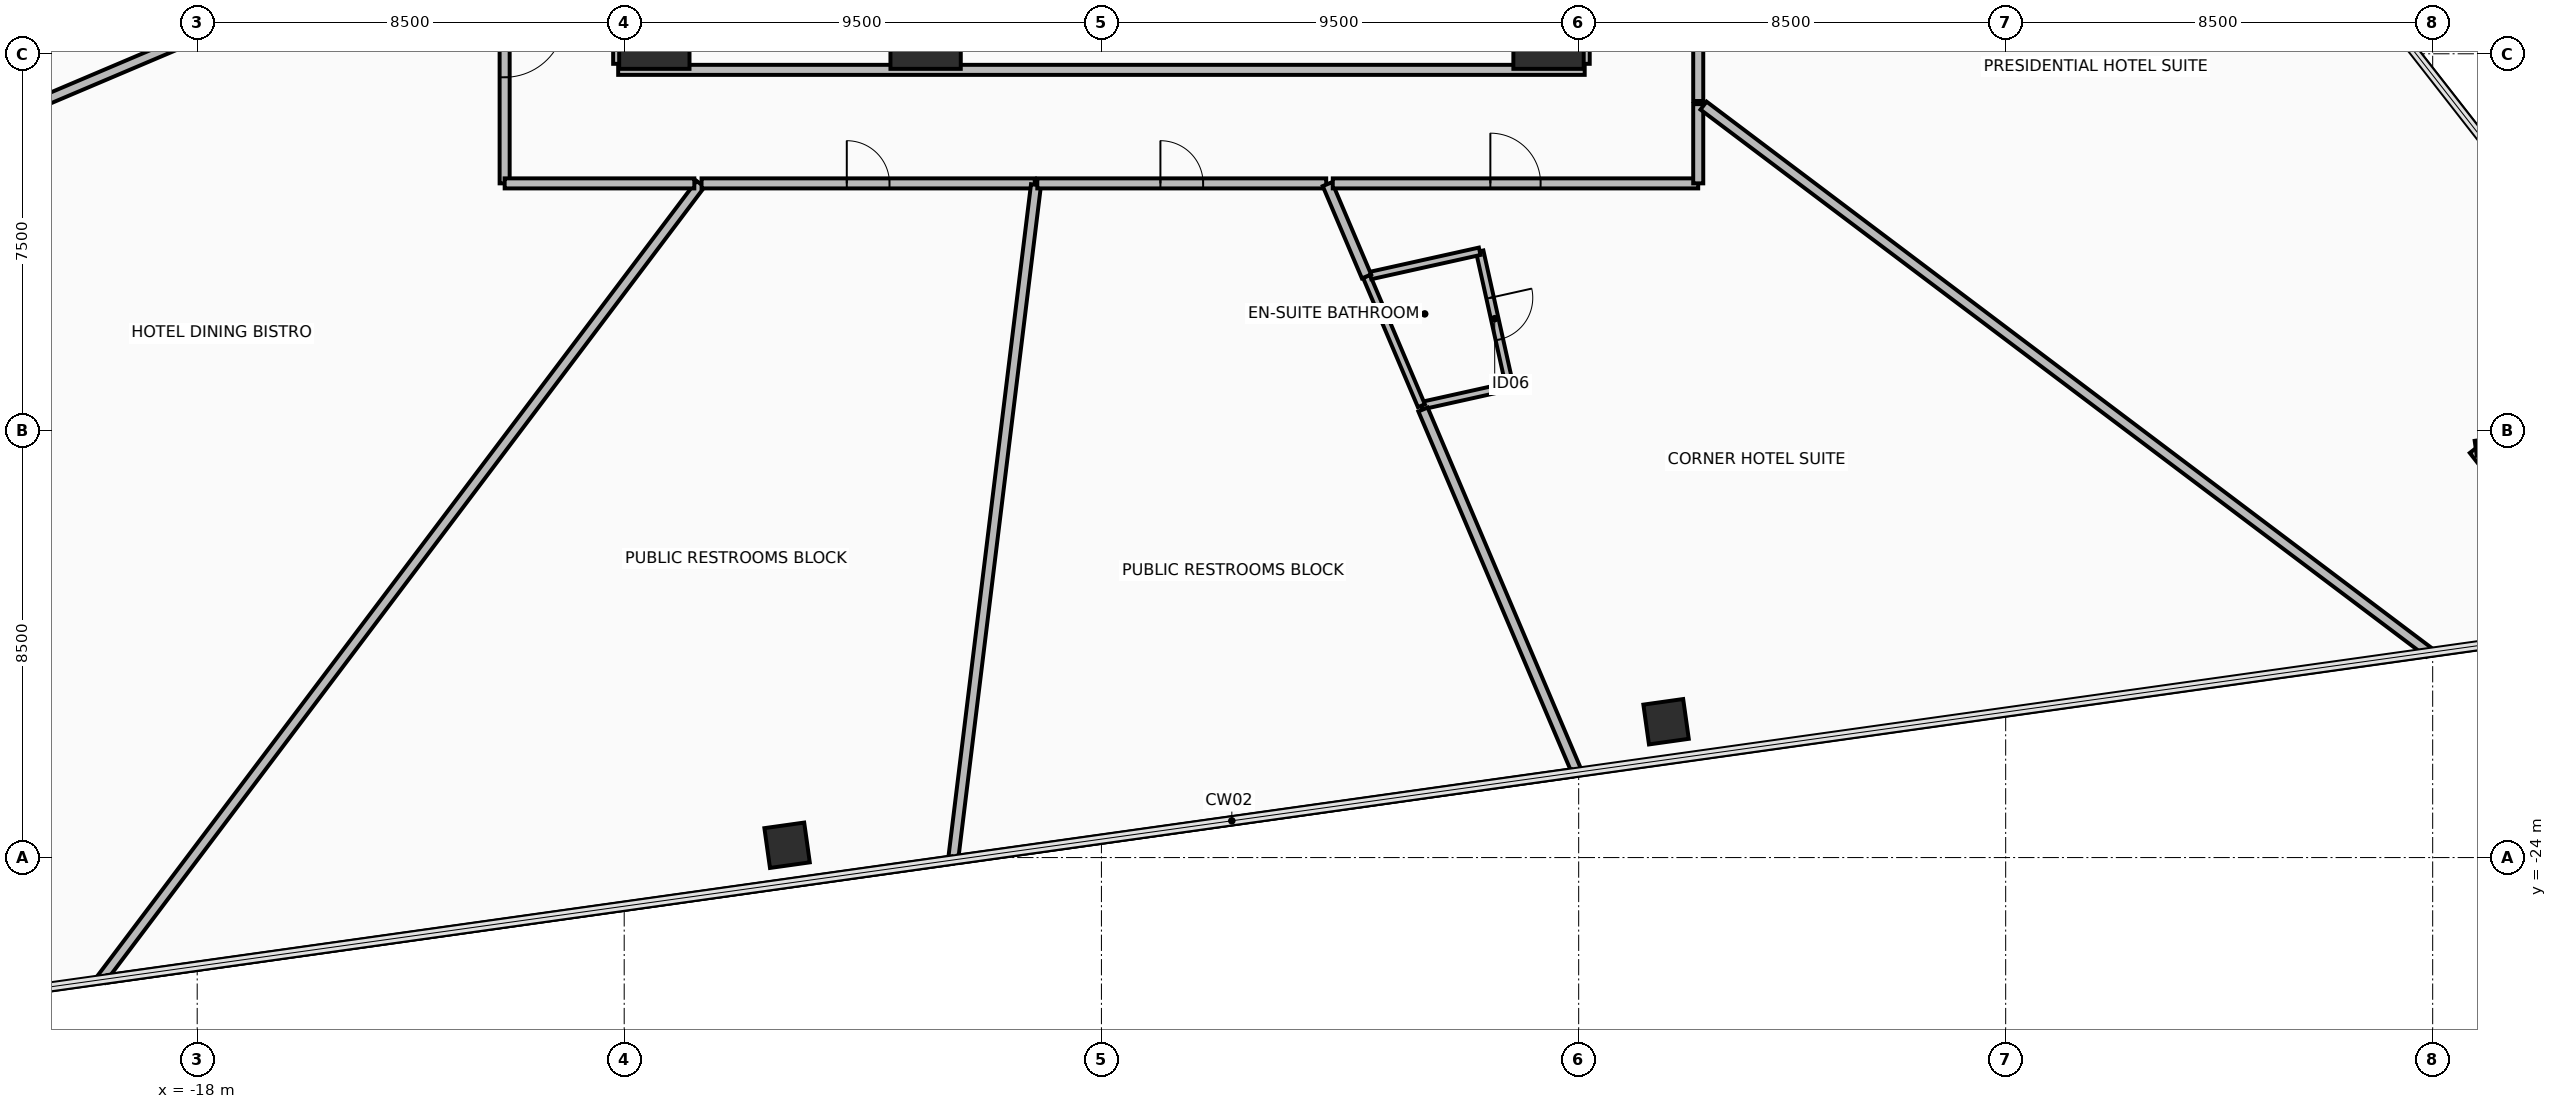
"""IFC4 building model, lengths in metres.
Left out: names, types, materials, properties, quantities, classifications, styles, units other than length and angle.
Written with IfcOpenShell. Run it as: python <this file> out.ifc"""

import sys

from ifc_helpers import new_model, si_unit, direction, frame, frame_2d, origin, origin_2d, place, context, subcontext, project, spatial, rectangle, hollow_rectangle, extrude, element, fill, save


model = new_model("IFC4")
c1 = context("Model", 3, precision=1e-05, world=origin(), true_north=direction((0.0, 1.0)))
c2 = subcontext(c1, "Body", "Model", "MODEL_VIEW")
j1 = project(units=[si_unit("LENGTHUNIT", "METRE"), si_unit("PLANEANGLEUNIT", "RADIAN")], contexts=[c1])
p1 = place(None, origin())
s1 = spatial("IfcSite", under=j1, at=p1, CompositionType="ELEMENT")
p2 = place(p1, origin())
s2 = spatial("IfcBuilding", under=s1, at=p2, CompositionType="ELEMENT")
p3 = place(p2, frame((0.0, 0.0, 74.2)))
s3 = spatial("IfcBuildingStorey", under=s2, at=p3, CompositionType="ELEMENT", Elevation=74.2)
for number, where, z_axis, x_axis in (
    (1, (-8.9, -7.6, 0.0), (0.0, 0.0, 1.0), (1.0, 0.0, 0.0)),
    (2, (-3.5, -7.6, 0.0), (0.0, 0.0, 1.0), (1.0, 0.0, 0.0)),
    (3, (8.9, -7.6, 0.0), (0.0, 0.0, 1.0), (1.0, 0.0, 0.0)),
):
    element("IfcColumn", number, at=place(p3, frame(where, z_axis=z_axis, x_axis=x_axis)), inside=s3, PredefinedType="COLUMN", context=c2, shape_type="SweptSolid", body=[
        extrude(rectangle(XDim=1.4, YDim=1.4, at=origin_2d()), origin(), (0.0, 0.0, 1.0), 3.45),
    ])
for number, where, z_axis, x_axis in (
    (4, (-6.257, -23.755, 0.0), (0.0, 0.0, 1.0), (0.99, 0.139, 0.0)),
    (5, (11.24, -21.296, 0.0), (0.0, 0.0, 1.0), (0.99, 0.139, 0.0)),
):
    element("IfcColumn", number, at=place(p3, frame(where, z_axis=z_axis, x_axis=x_axis)), inside=s3, PredefinedType="COLUMN", context=c2, shape_type="SweptSolid", body=[
        extrude(hollow_rectangle(XDim=0.8, YDim=0.8, WallThickness=0.045, at=origin_2d()), origin(), (0.0, 0.0, 1.0), 3.45),
    ])
p4 = place(p3, frame((30.128, -19.399, 0.0), z_axis=(0.0, 0.0, 1.0), x_axis=(-0.615621932091, 0.78804164657, 0.0)))
e6 = element("IfcWall", 6, at=p4, inside=s3, PredefinedType="STANDARD", context=c2, shape_type="SweptSolid", body=[
    extrude(rectangle(XDim=4.5, YDim=0.3, at=frame_2d((2.25, 0.0))), origin(), (0.0, 0.0, 1.0), 2.47),
])
p5 = place(p3, frame((27.357, -15.853, 0.0), z_axis=(0.0, 0.0, 1.0), x_axis=(0.990269200152, 0.139165050317, 0.0)))
e7 = element("IfcWall", 7, at=p5, inside=s3, PredefinedType="STANDARD", context=c2, shape_type="SweptSolid", body=[
    extrude(rectangle(XDim=4.5, YDim=0.3, at=frame_2d((2.25, 0.0))), origin(), (0.0, 0.0, 1.0), 2.47),
])
p6 = place(p3, frame((-9.62, -8.32, 0.0), z_axis=(0.0, 0.0, 1.0), x_axis=(1.0, 0.0, 0.0)))
e8 = element("IfcWall", 8, at=p6, inside=s3, PredefinedType="PARTITIONING", context=c2, shape_type="SweptSolid", body=[
    extrude(rectangle(XDim=19.24, YDim=0.2, at=frame_2d((9.62, 0.0))), origin(), (0.0, 0.0, 1.0), 2.67),
])
p7 = place(p3, frame((-9.62, 8.2, 0.0), z_axis=(0.0, 0.0, 1.0), x_axis=(0.0, -1.0, 0.0)))
e9 = element("IfcWall", 9, at=p7, inside=s3, PredefinedType="PARTITIONING", context=c2, shape_type="SweptSolid", body=[
    extrude(rectangle(XDim=16.4, YDim=0.2, at=frame_2d((8.2, 0.0))), origin(), (0.0, 0.0, 1.0), 2.67),
])
p8 = place(p7, frame((12.65, 0.0, 0.0)))
e10 = element("IfcOpeningElement", 10, at=p8, cuts=e9, PredefinedType="OPENING", context=c2, shape_type="SweptSolid", body=[
    extrude(rectangle(XDim=1.1, YDim=2.15, at=frame_2d((0.55, 1.075))), frame((0.0, 0.11, 0.0), z_axis=(0.0, -1.0, 0.0), x_axis=(1.0, 0.0, 0.0)), (0.0, 0.0, 1.0), 0.22),
])
p9 = place(p3, frame((9.62, -8.2, 0.0), z_axis=(0.0, 0.0, 1.0), x_axis=(0.0, 1.0, 0.0)))
e11 = element("IfcWall", 11, at=p9, inside=s3, PredefinedType="PARTITIONING", context=c2, shape_type="SweptSolid", body=[
    extrude(rectangle(XDim=16.4, YDim=0.2, at=frame_2d((8.2, 0.0))), origin(), (0.0, 0.0, 1.0), 2.67),
])
p10 = place(p9, frame((12.65, 0.0, 0.0)))
e12 = element("IfcOpeningElement", 12, at=p10, cuts=e11, PredefinedType="OPENING", context=c2, shape_type="SweptSolid", body=[
    extrude(rectangle(XDim=1.1, YDim=2.15, at=frame_2d((0.55, 1.075))), frame((0.0, 0.11, 0.0), z_axis=(0.0, -1.0, 0.0), x_axis=(1.0, 0.0, 0.0)), (0.0, 0.0, 1.0), 0.22),
])
p11 = place(p3, frame((7.53, -11.931, 0.0), z_axis=(0.0, 0.0, 1.0), x_axis=(0.216986861088, -0.976174524414, 0.0)))
e13 = element("IfcWall", 13, at=p11, inside=s3, PredefinedType="PARTITIONING", context=c2, shape_type="SweptSolid", body=[
    extrude(rectangle(XDim=2.75, YDim=0.15, at=frame_2d((1.375, 0.0))), origin(), (0.0, 0.0, 1.0), 3.275),
])
p12 = place(p11, frame((0.95, 0.0, 0.0)))
e14 = element("IfcOpeningElement", 14, at=p12, cuts=e13, PredefinedType="OPENING", context=c2, shape_type="SweptSolid", body=[
    extrude(rectangle(XDim=0.85, YDim=2.1, at=frame_2d((0.425, 1.05))), frame((0.0, 0.085, 0.0), z_axis=(0.0, -1.0, 0.0), x_axis=(1.0, 0.0, 0.0)), (0.0, 0.0, 1.0), 0.17),
])
p13 = place(p3, frame((8.049, -14.633, 0.0), z_axis=(0.0, 0.0, 1.0), x_axis=(-0.976193739746, -0.216900397605, 0.0)))
e15 = element("IfcWall", 15, at=p13, inside=s3, PredefinedType="PARTITIONING", context=c2, shape_type="SweptSolid", body=[
    extrude(rectangle(XDim=1.72, YDim=0.15, at=frame_2d((0.86, 0.0))), origin(), (0.0, 0.0, 1.0), 3.275),
])
p14 = place(p3, frame((6.37, -15.006, 0.0), z_axis=(0.0, 0.0, 1.0), x_axis=(-0.390682122561, 0.920525653695, 0.0)))
e16 = element("IfcWall", 16, at=p14, inside=s3, PredefinedType="PARTITIONING", context=c2, shape_type="SweptSolid", body=[
    extrude(rectangle(XDim=2.796, YDim=0.15, at=frame_2d((1.398, 0.0))), origin(), (0.0, 0.0, 1.0), 3.275),
])
p15 = place(p3, frame((5.356, -12.414, 0.0), z_axis=(0.0, 0.0, 1.0), x_axis=(0.976174158984, 0.216988505069, 0.0)))
e17 = element("IfcWall", 17, at=p15, inside=s3, PredefinedType="PARTITIONING", context=c2, shape_type="SweptSolid", body=[
    extrude(rectangle(XDim=2.227, YDim=0.15, at=frame_2d((1.113, 0.0))), origin(), (0.0, 0.0, 1.0), 3.275),
])
p16 = place(p3, frame((-19.918, -26.433, 0.0), z_axis=(0.0, 0.0, 1.0), x_axis=(0.601823847332, 0.798628860475, 0.0)))
e18 = element("IfcWall", 18, at=p16, inside=s3, PredefinedType="PARTITIONING", context=c2, shape_type="SweptSolid", body=[
    extrude(rectangle(XDim=19.837, YDim=0.2, at=frame_2d((9.918, 0.0))), origin(), (0.0, 0.0, 1.0), 2.47),
])
p17 = place(p3, frame((-7.96, -10.58, 0.0), z_axis=(0.0, 0.0, 1.0), x_axis=(1.0, 0.0, 0.0)))
e19 = element("IfcWall", 19, at=p17, inside=s3, PredefinedType="PARTITIONING", context=c2, shape_type="SweptSolid", body=[
    extrude(rectangle(XDim=6.633, YDim=0.2, at=frame_2d((3.316, 0.0))), origin(), (0.0, 0.0, 1.0), 3.275),
])
p18 = place(p17, frame((2.891, 0.0, 0.0)))
e20 = element("IfcOpeningElement", 20, at=p18, cuts=e19, PredefinedType="OPENING", context=c2, shape_type="SweptSolid", body=[
    extrude(rectangle(XDim=0.85, YDim=2.1, at=frame_2d((0.425, 1.05))), frame((0.0, 0.11, 0.0), z_axis=(0.0, -1.0, 0.0), x_axis=(1.0, 0.0, 0.0)), (0.0, 0.0, 1.0), 0.22),
])
p19 = place(p3, frame((-1.302, -10.608, 0.0), z_axis=(0.0, 0.0, 1.0), x_axis=(-0.121870082422, -0.992546060901, 0.0)))
e21 = element("IfcWall", 21, at=p19, inside=s3, PredefinedType="PARTITIONING", context=c2, shape_type="SweptSolid", body=[
    extrude(rectangle(XDim=13.522, YDim=0.2, at=frame_2d((6.761, 0.0))), origin(), (0.0, 0.0, 1.0), 2.47),
])
p20 = place(p3, frame((-2.972, -24.051, 0.0), z_axis=(0.0, 0.0, 1.0), x_axis=(-0.99026786231, -0.13917456979, 0.0)))
e22 = element("IfcWall", 22, at=p20, inside=s3, PredefinedType="PARTITIONING", context=c2, shape_type="SweptSolid", body=[
    extrude(rectangle(XDim=16.965, YDim=0.15, at=frame_2d((8.482, 0.0))), origin(), (0.0, 0.0, 1.0), 3.275),
])
p21 = place(p3, frame((-1.277, -10.58, 0.0), z_axis=(0.0, 0.0, 1.0), x_axis=(1.0, 0.0, 0.0)))
e23 = element("IfcWall", 23, at=p21, inside=s3, PredefinedType="PARTITIONING", context=c2, shape_type="SweptSolid", body=[
    extrude(rectangle(XDim=5.751, YDim=0.2, at=frame_2d((2.875, 0.0))), origin(), (0.0, 0.0, 1.0), 3.275),
])
p22 = place(p21, frame((2.451, 0.0, 0.0)))
e24 = element("IfcOpeningElement", 24, at=p22, cuts=e23, PredefinedType="OPENING", context=c2, shape_type="SweptSolid", body=[
    extrude(rectangle(XDim=0.85, YDim=2.1, at=frame_2d((0.425, 1.05))), frame((0.0, 0.11, 0.0), z_axis=(0.0, -1.0, 0.0), x_axis=(1.0, 0.0, 0.0)), (0.0, 0.0, 1.0), 0.22),
])
p23 = place(p3, frame((4.497, -10.595, 0.0), z_axis=(0.0, 0.0, 1.0), x_axis=(0.390801207123, -0.920475103689, 0.0)))
e25 = element("IfcWall", 25, at=p23, inside=s3, PredefinedType="PARTITIONING", context=c2, shape_type="SweptSolid", body=[
    extrude(rectangle(XDim=1.995, YDim=0.2, at=frame_2d((0.998, 0.0))), origin(), (0.0, 0.0, 1.0), 3.275),
])
p24 = place(p3, frame((6.401, -15.081, 0.0), z_axis=(0.0, 0.0, 1.0), x_axis=(0.390720857349, -0.920509213225, 0.0)))
e26 = element("IfcWall", 26, at=p24, inside=s3, PredefinedType="PARTITIONING", context=c2, shape_type="SweptSolid", body=[
    extrude(rectangle(XDim=7.845, YDim=0.2, at=frame_2d((3.923, 0.0))), origin(), (0.0, 0.0, 1.0), 2.47),
])
p25 = place(p3, frame((9.359, -22.318, 0.0), z_axis=(0.0, 0.0, 1.0), x_axis=(-0.990266692115, -0.139182895813, 0.0)))
e27 = element("IfcWall", 27, at=p25, inside=s3, PredefinedType="PARTITIONING", context=c2, shape_type="SweptSolid", body=[
    extrude(rectangle(XDim=12.324, YDim=0.15, at=frame_2d((6.162, 0.0))), origin(), (0.0, 0.0, 1.0), 3.275),
])
p26 = place(p3, frame((-11.895, -5.049, 0.0), z_axis=(0.0, 0.0, 1.0), x_axis=(-0.920504230584, -0.390732595872, 0.0)))
e28 = element("IfcWall", 28, at=p26, inside=s3, PredefinedType="PARTITIONING", context=c2, shape_type="SweptSolid", body=[
    extrude(rectangle(XDim=10.909, YDim=0.2, at=frame_2d((5.455, 0.0))), origin(), (0.0, 0.0, 1.0), 2.47),
])
p27 = place(p3, frame((-11.88, -5.157, 0.0), z_axis=(0.0, 0.0, 1.0), x_axis=(0.0, -1.0, 0.0)))
e29 = element("IfcWall", 29, at=p27, inside=s3, PredefinedType="PARTITIONING", context=c2, shape_type="SweptSolid", body=[
    extrude(rectangle(XDim=5.423, YDim=0.2, at=frame_2d((2.711, 0.0))), origin(), (0.0, 0.0, 1.0), 2.67),
])
p28 = place(p27, frame((2.111, 0.0, 0.0)))
e30 = element("IfcOpeningElement", 30, at=p28, cuts=e29, PredefinedType="OPENING", context=c2, shape_type="SweptSolid", body=[
    extrude(rectangle(XDim=1.2, YDim=2.15, at=frame_2d((0.6, 1.075))), frame((0.0, 0.11, 0.0), z_axis=(0.0, -1.0, 0.0), x_axis=(1.0, 0.0, 0.0)), (0.0, 0.0, 1.0), 0.22),
])
p29 = place(p3, frame((-11.879, -10.58, 0.0), z_axis=(0.0, 0.0, 1.0), x_axis=(1.0, 0.0, 0.0)))
e31 = element("IfcWall", 31, at=p29, inside=s3, PredefinedType="PARTITIONING", context=c2, shape_type="SweptSolid", body=[
    extrude(rectangle(XDim=3.775, YDim=0.2, at=frame_2d((1.888, 0.0))), origin(), (0.0, 0.0, 1.0), 2.67),
])
p30 = place(p3, frame((4.605, -10.58, 0.0), z_axis=(0.0, 0.0, 1.0), x_axis=(1.0, 0.0, 0.0)))
e32 = element("IfcWall", 32, at=p30, inside=s3, PredefinedType="PARTITIONING", context=c2, shape_type="SweptSolid", body=[
    extrude(rectangle(XDim=7.274, YDim=0.2, at=frame_2d((3.637, 0.0))), origin(), (0.0, 0.0, 1.0), 2.67),
])
p31 = place(p30, frame((3.137, 0.0, 0.0)))
e33 = element("IfcOpeningElement", 33, at=p31, cuts=e32, PredefinedType="OPENING", context=c2, shape_type="SweptSolid", body=[
    extrude(rectangle(XDim=1.0, YDim=2.15, at=frame_2d((0.5, 1.075))), frame((0.0, 0.11, 0.0), z_axis=(0.0, -1.0, 0.0), x_axis=(1.0, 0.0, 0.0)), (0.0, 0.0, 1.0), 0.22),
])
p32 = place(p3, frame((11.88, -10.579, 0.0), z_axis=(0.0, 0.0, 1.0), x_axis=(0.0, 1.0, 0.0)))
e34 = element("IfcWall", 34, at=p32, inside=s3, PredefinedType="PARTITIONING", context=c2, shape_type="SweptSolid", body=[
    extrude(rectangle(XDim=1.577, YDim=0.2, at=frame_2d((0.789, 0.0))), origin(), (0.0, 0.0, 1.0), 2.67),
])
p33 = place(p3, frame((11.985, -9.031, 0.0), z_axis=(0.0, 0.0, 1.0), x_axis=(0.798635951275, -0.601814437623, 0.0)))
e35 = element("IfcWall", 35, at=p33, inside=s3, PredefinedType="PARTITIONING", context=c2, shape_type="SweptSolid", body=[
    extrude(rectangle(XDim=18.09, YDim=0.2, at=frame_2d((9.045, 0.0))), origin(), (0.0, 0.0, 1.0), 2.47),
])
p34 = place(p3, frame((11.88, -8.94, 0.0), z_axis=(0.0, 0.0, 1.0), x_axis=(0.0, 1.0, 0.0)))
e36 = element("IfcWall", 36, at=p34, inside=s3, PredefinedType="PARTITIONING", context=c2, shape_type="SweptSolid", body=[
    extrude(rectangle(XDim=7.453, YDim=0.2, at=frame_2d((3.727, 0.0))), origin(), (0.0, 0.0, 1.0), 2.67),
])
p35 = place(p34, frame((3.226, 0.0, 0.0)))
e37 = element("IfcOpeningElement", 37, at=p35, cuts=e36, PredefinedType="OPENING", context=c2, shape_type="SweptSolid", body=[
    extrude(rectangle(XDim=1.0, YDim=2.15, at=frame_2d((0.5, 1.075))), frame((0.0, 0.11, 0.0), z_axis=(0.0, -1.0, 0.0), x_axis=(1.0, 0.0, 0.0)), (0.0, 0.0, 1.0), 0.22),
])
p36 = place(p12, origin())
e38 = element("IfcDoor", 38, at=p36, inside=s3, OperationType="SINGLE_SWING_RIGHT", PredefinedType="DOOR", context=c2, shape_type="SweptSolid", body=[
    extrude(rectangle(XDim=0.85, YDim=2.1, at=frame_2d((0.425, 1.05))), frame((0.0, 0.025, 0.0), z_axis=(0.0, -1.0, 0.0), x_axis=(1.0, 0.0, 0.0)), (0.0, 0.0, 1.0), 0.05),
])
fill(e14, e38)
p37 = place(p18, origin())
e39 = element("IfcDoor", 39, at=p37, inside=s3, OperationType="SINGLE_SWING_RIGHT", PredefinedType="DOOR", context=c2, shape_type="SweptSolid", body=[
    extrude(rectangle(XDim=0.85, YDim=2.1, at=frame_2d((0.425, 1.05))), frame((0.0, 0.025, 0.0), z_axis=(0.0, -1.0, 0.0), x_axis=(1.0, 0.0, 0.0)), (0.0, 0.0, 1.0), 0.05),
])
fill(e20, e39)
p38 = place(p22, origin())
e40 = element("IfcDoor", 40, at=p38, inside=s3, OperationType="SINGLE_SWING_RIGHT", PredefinedType="DOOR", context=c2, shape_type="SweptSolid", body=[
    extrude(rectangle(XDim=0.85, YDim=2.1, at=frame_2d((0.425, 1.05))), frame((0.0, 0.025, 0.0), z_axis=(0.0, -1.0, 0.0), x_axis=(1.0, 0.0, 0.0)), (0.0, 0.0, 1.0), 0.05),
])
fill(e24, e40)
p39 = place(p28, origin())
e41 = element("IfcDoor", 41, at=p39, inside=s3, OperationType="SINGLE_SWING_LEFT", PredefinedType="DOOR", context=c2, shape_type="SweptSolid", body=[
    extrude(rectangle(XDim=1.2, YDim=2.15, at=frame_2d((0.6, 1.075))), frame((0.0, 0.025, 0.0), z_axis=(0.0, -1.0, 0.0), x_axis=(1.0, 0.0, 0.0)), (0.0, 0.0, 1.0), 0.05),
])
fill(e30, e41)
p40 = place(p31, origin())
e42 = element("IfcDoor", 42, at=p40, inside=s3, OperationType="SINGLE_SWING_LEFT", PredefinedType="DOOR", context=c2, shape_type="SweptSolid", body=[
    extrude(rectangle(XDim=1.0, YDim=2.15, at=frame_2d((0.5, 1.075))), frame((0.0, 0.025, 0.0), z_axis=(0.0, -1.0, 0.0), x_axis=(1.0, 0.0, 0.0)), (0.0, 0.0, 1.0), 0.05),
])
fill(e33, e42)
save(model, sys.argv[1])
